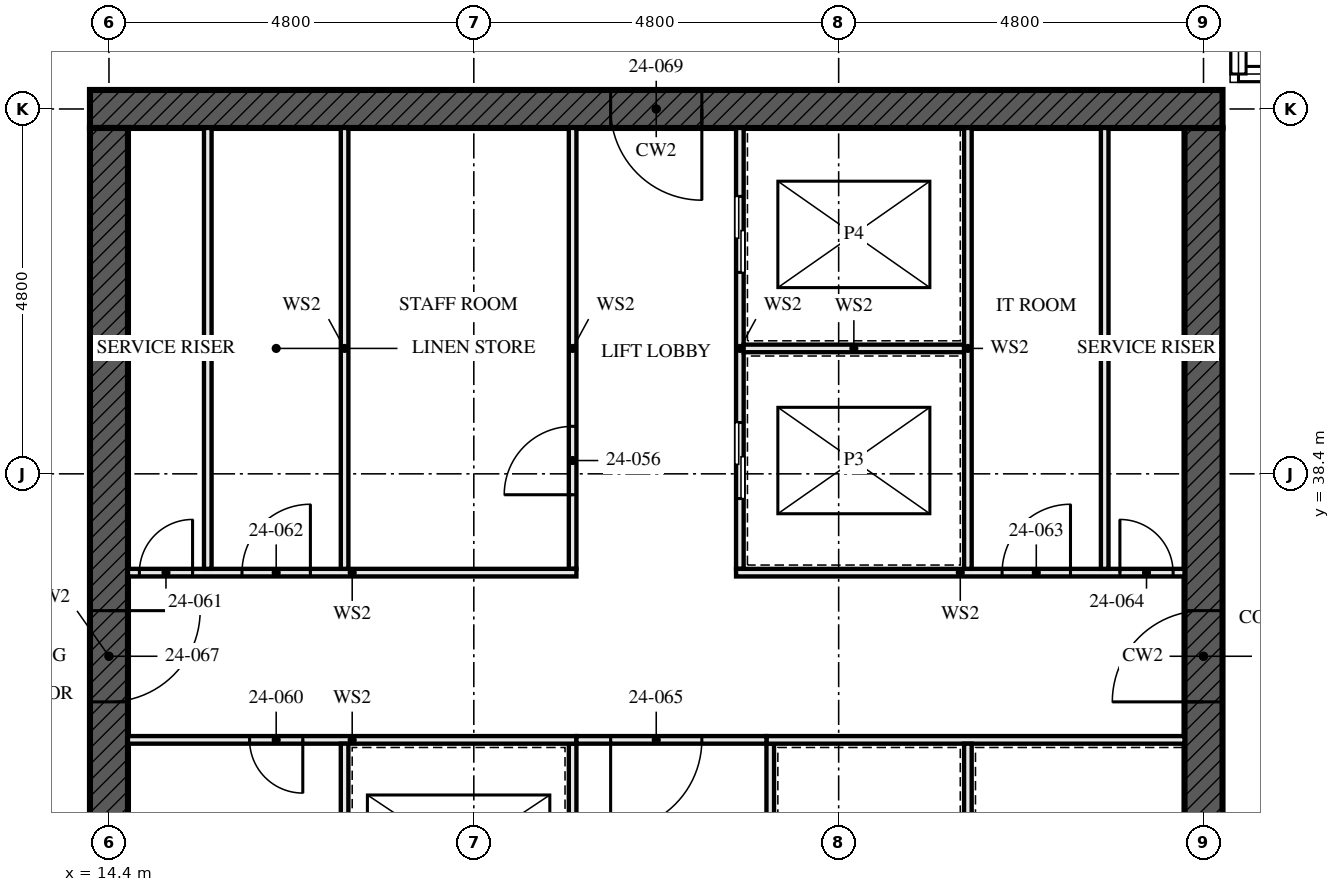
"""IFC4 building model, lengths in metres.
Left out: names, types, materials, properties, quantities, classifications, styles, units other than length and angle.
Written with IfcOpenShell. Run it as: python <this file> out.ifc"""

import sys

from ifc_helpers import new_model, si_unit, direction, frame, frame_2d, origin, place, context, subcontext, project, spatial, rectangle, extrude, element, fill, save


model = new_model("IFC4")
c1 = context("Model", 3, precision=1e-05, world=origin(), true_north=direction((0.0, 1.0)))
c2 = subcontext(c1, "Body", "Model", "MODEL_VIEW")
j1 = project(units=[si_unit("LENGTHUNIT", "METRE"), si_unit("PLANEANGLEUNIT", "RADIAN")], contexts=[c1])
p1 = place(None, origin())
s1 = spatial("IfcSite", under=j1, at=p1, CompositionType="ELEMENT")
p2 = place(p1, origin())
s2 = spatial("IfcBuilding", under=s1, at=p2, CompositionType="ELEMENT")
p3 = place(p2, frame((0.0, 0.0, 91.0)))
s3 = spatial("IfcBuildingStorey", under=s2, at=p3, CompositionType="ELEMENT", Elevation=91.0)
p4 = place(p3, frame((29.05, 43.2, -0.17), z_axis=(0.0, 0.0, 1.0), x_axis=(-1.0, 0.0, 0.0)))
e1 = element("IfcWall", 1, at=p4, inside=s3, PredefinedType="SHEAR", context=c2, shape_type="SweptSolid", body=[
    extrude(rectangle(XDim=14.9, YDim=0.5, at=frame_2d((7.45, 0.0))), origin(), (0.0, 0.0, 1.0), 3.5),
])
p5 = place(p4, frame((6.85, 0.0, 0.17)))
e2 = element("IfcOpeningElement", 2, at=p5, cuts=e1, PredefinedType="OPENING", context=c2, shape_type="SweptSolid", body=[
    extrude(rectangle(XDim=1.2, YDim=2.1, at=frame_2d((0.6, 1.05))), frame((0.0, 0.26, 0.0), z_axis=(0.0, -1.0, 0.0), x_axis=(1.0, 0.0, 0.0)), (0.0, 0.0, 1.0), 0.521),
])
p6 = place(p3, frame((14.4, 42.95, -0.17), z_axis=(0.0, 0.0, 1.0), x_axis=(0.0, -1.0, 0.0)))
e3 = element("IfcWall", 3, at=p6, inside=s3, PredefinedType="SHEAR", context=c2, shape_type="SweptSolid", body=[
    extrude(rectangle(XDim=13.9, YDim=0.5, at=frame_2d((6.95, 0.0))), origin(), (0.0, 0.0, 1.0), 3.5),
])
p7 = place(p6, frame((6.35, 0.0, 0.17)))
e4 = element("IfcOpeningElement", 4, at=p7, cuts=e3, PredefinedType="OPENING", context=c2, shape_type="SweptSolid", body=[
    extrude(rectangle(XDim=1.2, YDim=2.1, at=frame_2d((0.6, 1.05))), frame((0.0, 0.26, 0.0), z_axis=(0.0, -1.0, 0.0), x_axis=(1.0, 0.0, 0.0)), (0.0, 0.0, 1.0), 0.521),
])
p8 = place(p3, frame((28.8, 29.05, -0.17), z_axis=(0.0, 0.0, 1.0), x_axis=(0.0, 1.0, 0.0)))
e5 = element("IfcWall", 5, at=p8, inside=s3, PredefinedType="SHEAR", context=c2, shape_type="SweptSolid", body=[
    extrude(rectangle(XDim=13.9, YDim=0.5, at=frame_2d((6.95, 0.0))), origin(), (0.0, 0.0, 1.0), 3.5),
])
p9 = place(p8, frame((6.35, 0.0, 0.17)))
e6 = element("IfcOpeningElement", 6, at=p9, cuts=e5, PredefinedType="OPENING", context=c2, shape_type="SweptSolid", body=[
    extrude(rectangle(XDim=1.2, YDim=2.1, at=frame_2d((0.6, 1.05))), frame((0.0, 0.26, 0.0), z_axis=(0.0, -1.0, 0.0), x_axis=(1.0, 0.0, 0.0)), (0.0, 0.0, 1.0), 0.521),
])
for number, where, z_axis, x_axis in (
    (7, (15.7, 37.15, 0.0), (0.0, 0.0, 1.0), (0.0, 1.0, 0.0)),
    (8, (27.5, 37.15, 0.0), (0.0, 0.0, 1.0), (0.0, 1.0, 0.0)),
):
    element("IfcWall", number, at=place(p3, frame(where, z_axis=z_axis, x_axis=x_axis)), inside=s3, PredefinedType="SOLIDWALL", context=c2, shape_type="SweptSolid", body=[
        extrude(rectangle(XDim=5.8, YDim=0.1, at=frame_2d((2.9, 0.0))), origin(), (0.0, 0.0, 1.0), 3.33),
    ])
p10 = place(p3, frame((20.5, 29.05, 0.0), z_axis=(0.0, 0.0, 1.0), x_axis=(0.0, 1.0, 0.0)))
e9 = element("IfcWall", 9, at=p10, inside=s3, PredefinedType="SOLIDWALL", context=c2, shape_type="SweptSolid", body=[
    extrude(rectangle(XDim=5.8, YDim=0.1, at=frame_2d((2.9, 0.0))), origin(), (0.0, 0.0, 1.0), 3.33),
])
p11 = place(p10, frame((0.8, 0.0, 0.0)))
e10 = element("IfcOpeningElement", 10, at=p11, cuts=e9, PredefinedType="OPENING", context=c2, shape_type="SweptSolid", body=[
    extrude(rectangle(XDim=1.1, YDim=2.3, at=frame_2d((0.55, 1.15))), frame((0.0, 0.061, 0.0), z_axis=(0.0, -1.0, 0.0), x_axis=(1.0, 0.0, 0.0)), (0.0, 0.0, 1.0), 0.121),
])
p12 = place(p10, frame((3.775, 0.0, 0.0)))
e11 = element("IfcOpeningElement", 11, at=p12, cuts=e9, PredefinedType="OPENING", context=c2, shape_type="SweptSolid", body=[
    extrude(rectangle(XDim=1.1, YDim=2.3, at=frame_2d((0.55, 1.15))), frame((0.0, 0.061, 0.0), z_axis=(0.0, -1.0, 0.0), x_axis=(1.0, 0.0, 0.0)), (0.0, 0.0, 1.0), 0.121),
])
p13 = place(p3, frame((20.5, 37.15, 0.0), z_axis=(0.0, 0.0, 1.0), x_axis=(0.0, 1.0, 0.0)))
e12 = element("IfcWall", 12, at=p13, inside=s3, PredefinedType="SOLIDWALL", context=c2, shape_type="SweptSolid", body=[
    extrude(rectangle(XDim=5.8, YDim=0.1, at=frame_2d((2.9, 0.0))), origin(), (0.0, 0.0, 1.0), 3.33),
])
p14 = place(p13, frame((0.975, 0.0, 0.0)))
e13 = element("IfcOpeningElement", 13, at=p14, cuts=e12, PredefinedType="OPENING", context=c2, shape_type="SweptSolid", body=[
    extrude(rectangle(XDim=0.9, YDim=2.1, at=frame_2d((0.45, 1.05))), frame((0.0, 0.061, 0.0), z_axis=(0.0, -1.0, 0.0), x_axis=(1.0, 0.0, 0.0)), (0.0, 0.0, 1.0), 0.121),
])
p15 = place(p3, frame((22.7, 37.15, 0.0), z_axis=(0.0, 0.0, 1.0), x_axis=(0.0, 1.0, 0.0)))
e14 = element("IfcWall", 14, at=p15, inside=s3, PredefinedType="SOLIDWALL", context=c2, shape_type="SweptSolid", body=[
    extrude(rectangle(XDim=5.8, YDim=0.1, at=frame_2d((2.9, 0.0))), origin(), (0.0, 0.0, 1.0), 3.33),
])
p16 = place(p15, frame((0.925, 0.0, 0.0)))
e15 = element("IfcOpeningElement", 15, at=p16, cuts=e14, PredefinedType="OPENING", context=c2, shape_type="SweptSolid", body=[
    extrude(rectangle(XDim=1.0, YDim=2.1, at=frame_2d((0.5, 1.05))), frame((0.0, 0.061, 0.0), z_axis=(0.0, -1.0, 0.0), x_axis=(1.0, 0.0, 0.0)), (0.0, 0.0, 1.0), 0.121),
])
p17 = place(p15, frame((3.9, 0.0, 0.0)))
e16 = element("IfcOpeningElement", 16, at=p17, cuts=e14, PredefinedType="OPENING", context=c2, shape_type="SweptSolid", body=[
    extrude(rectangle(XDim=1.0, YDim=2.1, at=frame_2d((0.5, 1.05))), frame((0.0, 0.061, 0.0), z_axis=(0.0, -1.0, 0.0), x_axis=(1.0, 0.0, 0.0)), (0.0, 0.0, 1.0), 0.121),
])
p18 = place(p3, frame((23.1, 29.05, 0.0), z_axis=(0.0, 0.0, 1.0), x_axis=(0.0, 1.0, 0.0)))
e17 = element("IfcWall", 17, at=p18, inside=s3, PredefinedType="SOLIDWALL", context=c2, shape_type="SweptSolid", body=[
    extrude(rectangle(XDim=5.8, YDim=0.1, at=frame_2d((2.9, 0.0))), origin(), (0.0, 0.0, 1.0), 3.33),
])
p19 = place(p18, frame((1.0, 0.0, 0.0)))
e18 = element("IfcOpeningElement", 18, at=p19, cuts=e17, PredefinedType="OPENING", context=c2, shape_type="SweptSolid", body=[
    extrude(rectangle(XDim=0.7, YDim=2.1, at=frame_2d((0.35, 1.05))), frame((0.0, 0.061, 0.0), z_axis=(0.0, -1.0, 0.0), x_axis=(1.0, 0.0, 0.0)), (0.0, 0.0, 1.0), 0.121),
])
p20 = place(p3, frame((14.65, 34.9, 0.0), z_axis=(0.0, 0.0, 1.0), x_axis=(1.0, 0.0, 0.0)))
e19 = element("IfcWall", 19, at=p20, inside=s3, PredefinedType="SOLIDWALL", context=c2, shape_type="SweptSolid", body=[
    extrude(rectangle(XDim=5.9, YDim=0.1, at=frame_2d((2.95, 0.0))), origin(), (0.0, 0.0, 1.0), 3.33),
])
p21 = place(p20, frame((1.6, 0.0, 0.0)))
e20 = element("IfcOpeningElement", 20, at=p21, cuts=e19, PredefinedType="OPENING", context=c2, shape_type="SweptSolid", body=[
    extrude(rectangle(XDim=0.7, YDim=2.1, at=frame_2d((0.35, 1.05))), frame((0.0, 0.061, 0.0), z_axis=(0.0, -1.0, 0.0), x_axis=(1.0, 0.0, 0.0)), (0.0, 0.0, 1.0), 0.121),
])
p22 = place(p3, frame((23.05, 34.9, 0.0), z_axis=(0.0, 0.0, 1.0), x_axis=(1.0, 0.0, 0.0)))
e21 = element("IfcWall", 21, at=p22, inside=s3, PredefinedType="SOLIDWALL", context=c2, shape_type="SweptSolid", body=[
    extrude(rectangle(XDim=5.5, YDim=0.1, at=frame_2d((2.75, 0.0))), origin(), (0.0, 0.0, 1.0), 3.33),
])
p23 = place(p3, frame((14.65, 37.1, 0.0), z_axis=(0.0, 0.0, 1.0), x_axis=(1.0, 0.0, 0.0)))
e22 = element("IfcWall", 22, at=p23, inside=s3, PredefinedType="SOLIDWALL", context=c2, shape_type="SweptSolid", body=[
    extrude(rectangle(XDim=5.9, YDim=0.1, at=frame_2d((2.95, 0.0))), origin(), (0.0, 0.0, 1.0), 3.33),
])
p24 = place(p23, frame((0.15, 0.0, 0.0)))
e23 = element("IfcOpeningElement", 23, at=p24, cuts=e22, PredefinedType="OPENING", context=c2, shape_type="SweptSolid", body=[
    extrude(rectangle(XDim=0.7, YDim=2.1, at=frame_2d((0.35, 1.05))), frame((0.0, 0.061, 0.0), z_axis=(0.0, -1.0, 0.0), x_axis=(1.0, 0.0, 0.0)), (0.0, 0.0, 1.0), 0.121),
])
p25 = place(p23, frame((1.5, 0.0, 0.0)))
e24 = element("IfcOpeningElement", 24, at=p25, cuts=e22, PredefinedType="OPENING", context=c2, shape_type="SweptSolid", body=[
    extrude(rectangle(XDim=0.9, YDim=2.1, at=frame_2d((0.45, 1.05))), frame((0.0, 0.061, 0.0), z_axis=(0.0, -1.0, 0.0), x_axis=(1.0, 0.0, 0.0)), (0.0, 0.0, 1.0), 0.121),
])
p26 = place(p3, frame((22.65, 37.1, 0.0), z_axis=(0.0, 0.0, 1.0), x_axis=(1.0, 0.0, 0.0)))
e25 = element("IfcWall", 25, at=p26, inside=s3, PredefinedType="SOLIDWALL", context=c2, shape_type="SweptSolid", body=[
    extrude(rectangle(XDim=5.9, YDim=0.1, at=frame_2d((2.95, 0.0))), origin(), (0.0, 0.0, 1.0), 3.33),
])
p27 = place(p26, frame((3.5, 0.0, 0.0)))
e26 = element("IfcOpeningElement", 26, at=p27, cuts=e25, PredefinedType="OPENING", context=c2, shape_type="SweptSolid", body=[
    extrude(rectangle(XDim=0.9, YDim=2.1, at=frame_2d((0.45, 1.05))), frame((0.0, 0.061, 0.0), z_axis=(0.0, -1.0, 0.0), x_axis=(1.0, 0.0, 0.0)), (0.0, 0.0, 1.0), 0.121),
])
p28 = place(p26, frame((5.05, 0.0, 0.0)))
e27 = element("IfcOpeningElement", 27, at=p28, cuts=e25, PredefinedType="OPENING", context=c2, shape_type="SweptSolid", body=[
    extrude(rectangle(XDim=0.7, YDim=2.1, at=frame_2d((0.35, 1.05))), frame((0.0, 0.061, 0.0), z_axis=(0.0, -1.0, 0.0), x_axis=(1.0, 0.0, 0.0)), (0.0, 0.0, 1.0), 0.121),
])
p29 = place(p3, frame((20.55, 34.9, 0.0), z_axis=(0.0, 0.0, 1.0), x_axis=(1.0, 0.0, 0.0)))
e28 = element("IfcWall", 28, at=p29, inside=s3, PredefinedType="SOLIDWALL", context=c2, shape_type="SweptSolid", body=[
    extrude(rectangle(XDim=2.5, YDim=0.1, at=frame_2d((1.25, 0.0))), origin(), (0.0, 0.0, 1.0), 3.33),
])
p30 = place(p29, frame((0.45, 0.0, 0.0)))
e29 = element("IfcOpeningElement", 29, at=p30, cuts=e28, PredefinedType="OPENING", context=c2, shape_type="SweptSolid", body=[
    extrude(rectangle(XDim=1.2, YDim=2.1, at=frame_2d((0.6, 1.05))), frame((0.0, 0.061, 0.0), z_axis=(0.0, -1.0, 0.0), x_axis=(1.0, 0.0, 0.0)), (0.0, 0.0, 1.0), 0.121),
])
for number, where, z_axis, x_axis in (
    (30, (17.5, 29.05, 0.0), (0.0, 0.0, 1.0), (0.0, 1.0, 0.0)),
    (31, (17.5, 37.15, 0.0), (0.0, 0.0, 1.0), (0.0, 1.0, 0.0)),
):
    element("IfcWall", number, at=place(p3, frame(where, z_axis=z_axis, x_axis=x_axis)), inside=s3, PredefinedType="SOLIDWALL", context=c2, shape_type="SweptSolid", body=[
        extrude(rectangle(XDim=5.8, YDim=0.1, at=frame_2d((2.9, 0.0))), origin(), (0.0, 0.0, 1.0), 3.33),
    ])
p31 = place(p3, frame((22.75, 40.05, 0.0), z_axis=(0.0, 0.0, 1.0), x_axis=(1.0, 0.0, 0.0)))
e32 = element("IfcWall", 32, at=p31, inside=s3, PredefinedType="SOLIDWALL", context=c2, shape_type="SweptSolid", body=[
    extrude(rectangle(XDim=2.9, YDim=0.1, at=frame_2d((1.45, 0.0))), origin(), (0.0, 0.0, 1.0), 3.33),
])
p32 = place(p3, frame((25.7, 37.15, 0.0), z_axis=(0.0, 0.0, 1.0), x_axis=(0.0, 1.0, 0.0)))
e33 = element("IfcWall", 33, at=p32, inside=s3, PredefinedType="SOLIDWALL", context=c2, shape_type="SweptSolid", body=[
    extrude(rectangle(XDim=5.8, YDim=0.1, at=frame_2d((2.9, 0.0))), origin(), (0.0, 0.0, 1.0), 3.33),
])
p33 = place(p3, frame((25.7, 31.95, 0.0), z_axis=(0.0, 0.0, 1.0), x_axis=(0.0, 1.0, 0.0)))
e34 = element("IfcWall", 34, at=p33, inside=s3, PredefinedType="SOLIDWALL", context=c2, shape_type="SweptSolid", body=[
    extrude(rectangle(XDim=2.9, YDim=0.1, at=frame_2d((1.45, 0.0))), origin(), (0.0, 0.0, 1.0), 3.33),
])
p34 = place(p14, origin())
e35 = element("IfcDoor", 35, at=p34, inside=s3, OperationType="SINGLE_SWING_RIGHT", PredefinedType="DOOR", context=c2, shape_type="SweptSolid", body=[
    extrude(rectangle(XDim=0.9, YDim=2.1, at=frame_2d((0.45, 1.05))), frame((0.0, 0.027, 0.0), z_axis=(0.0, -1.0, 0.0), x_axis=(1.0, 0.0, 0.0)), (0.0, 0.0, 1.0), 0.054),
])
fill(e13, e35)
p35 = place(p16, origin())
e36 = element("IfcDoor", 36, at=p35, inside=s3, OperationType="SLIDING_TO_LEFT", PredefinedType="DOOR", context=c2, shape_type="SweptSolid", body=[
    extrude(rectangle(XDim=1.0, YDim=2.1, at=frame_2d((0.5, 1.05))), frame((0.0, 0.05, 0.0), z_axis=(0.0, -1.0, 0.0), x_axis=(1.0, 0.0, 0.0)), (0.0, 0.0, 1.0), 0.1),
])
fill(e15, e36)
p36 = place(p17, origin())
e37 = element("IfcDoor", 37, at=p36, inside=s3, OperationType="SLIDING_TO_LEFT", PredefinedType="DOOR", context=c2, shape_type="SweptSolid", body=[
    extrude(rectangle(XDim=1.0, YDim=2.1, at=frame_2d((0.5, 1.05))), frame((0.0, 0.05, 0.0), z_axis=(0.0, -1.0, 0.0), x_axis=(1.0, 0.0, 0.0)), (0.0, 0.0, 1.0), 0.1),
])
fill(e16, e37)
p37 = place(p21, frame((0.7, 0.0, 0.0), z_axis=(0.0, 0.0, 1.0), x_axis=(-1.0, 0.0, 0.0)))
e38 = element("IfcDoor", 38, at=p37, inside=s3, OperationType="SINGLE_SWING_RIGHT", PredefinedType="DOOR", context=c2, shape_type="SweptSolid", body=[
    extrude(rectangle(XDim=0.7, YDim=2.1, at=frame_2d((0.35, 1.05))), frame((0.0, 0.027, 0.0), z_axis=(0.0, -1.0, 0.0), x_axis=(1.0, 0.0, 0.0)), (0.0, 0.0, 1.0), 0.054),
])
fill(e20, e38)
p38 = place(p24, origin())
e39 = element("IfcDoor", 39, at=p38, inside=s3, OperationType="SINGLE_SWING_LEFT", PredefinedType="DOOR", context=c2, shape_type="SweptSolid", body=[
    extrude(rectangle(XDim=0.7, YDim=2.1, at=frame_2d((0.35, 1.05))), frame((0.0, 0.027, 0.0), z_axis=(0.0, -1.0, 0.0), x_axis=(1.0, 0.0, 0.0)), (0.0, 0.0, 1.0), 0.054),
])
fill(e23, e39)
p39 = place(p25, origin())
e40 = element("IfcDoor", 40, at=p39, inside=s3, OperationType="SINGLE_SWING_LEFT", PredefinedType="DOOR", context=c2, shape_type="SweptSolid", body=[
    extrude(rectangle(XDim=0.9, YDim=2.1, at=frame_2d((0.45, 1.05))), frame((0.0, 0.027, 0.0), z_axis=(0.0, -1.0, 0.0), x_axis=(1.0, 0.0, 0.0)), (0.0, 0.0, 1.0), 0.054),
])
fill(e24, e40)
p40 = place(p27, origin())
e41 = element("IfcDoor", 41, at=p40, inside=s3, OperationType="SINGLE_SWING_LEFT", PredefinedType="DOOR", context=c2, shape_type="SweptSolid", body=[
    extrude(rectangle(XDim=0.9, YDim=2.1, at=frame_2d((0.45, 1.05))), frame((0.0, 0.027, 0.0), z_axis=(0.0, -1.0, 0.0), x_axis=(1.0, 0.0, 0.0)), (0.0, 0.0, 1.0), 0.054),
])
fill(e26, e41)
p41 = place(p28, origin())
e42 = element("IfcDoor", 42, at=p41, inside=s3, OperationType="SINGLE_SWING_RIGHT", PredefinedType="DOOR", context=c2, shape_type="SweptSolid", body=[
    extrude(rectangle(XDim=0.7, YDim=2.1, at=frame_2d((0.35, 1.05))), frame((0.0, 0.027, 0.0), z_axis=(0.0, -1.0, 0.0), x_axis=(1.0, 0.0, 0.0)), (0.0, 0.0, 1.0), 0.054),
])
fill(e27, e42)
p42 = place(p30, frame((1.2, 0.0, 0.0), z_axis=(0.0, 0.0, 1.0), x_axis=(-1.0, 0.0, 0.0)))
e43 = element("IfcDoor", 43, at=p42, inside=s3, OperationType="SINGLE_SWING_LEFT", PredefinedType="DOOR", context=c2, shape_type="SweptSolid", body=[
    extrude(rectangle(XDim=1.2, YDim=2.1, at=frame_2d((0.6, 1.05))), frame((0.0, 0.027, 0.0), z_axis=(0.0, -1.0, 0.0), x_axis=(1.0, 0.0, 0.0)), (0.0, 0.0, 1.0), 0.054),
])
fill(e29, e43)
p43 = place(p7, origin())
e44 = element("IfcDoor", 44, at=p43, inside=s3, OperationType="SINGLE_SWING_LEFT", PredefinedType="DOOR", context=c2, shape_type="SweptSolid", body=[
    extrude(rectangle(XDim=1.2, YDim=2.1, at=frame_2d((0.6, 1.05))), frame((0.0, 0.027, 0.0), z_axis=(0.0, -1.0, 0.0), x_axis=(1.0, 0.0, 0.0)), (0.0, 0.0, 1.0), 0.054),
])
fill(e4, e44)
p44 = place(p9, origin())
e45 = element("IfcDoor", 45, at=p44, inside=s3, OperationType="SINGLE_SWING_LEFT", PredefinedType="DOOR", context=c2, shape_type="SweptSolid", body=[
    extrude(rectangle(XDim=1.2, YDim=2.1, at=frame_2d((0.6, 1.05))), frame((0.0, 0.027, 0.0), z_axis=(0.0, -1.0, 0.0), x_axis=(1.0, 0.0, 0.0)), (0.0, 0.0, 1.0), 0.054),
])
fill(e6, e45)
p45 = place(p5, origin())
e46 = element("IfcDoor", 46, at=p45, inside=s3, OperationType="SINGLE_SWING_LEFT", PredefinedType="DOOR", context=c2, shape_type="SweptSolid", body=[
    extrude(rectangle(XDim=1.2, YDim=2.1, at=frame_2d((0.6, 1.05))), frame((0.0, 0.027, 0.0), z_axis=(0.0, -1.0, 0.0), x_axis=(1.0, 0.0, 0.0)), (0.0, 0.0, 1.0), 0.054),
])
fill(e2, e46)
save(model, sys.argv[1])
